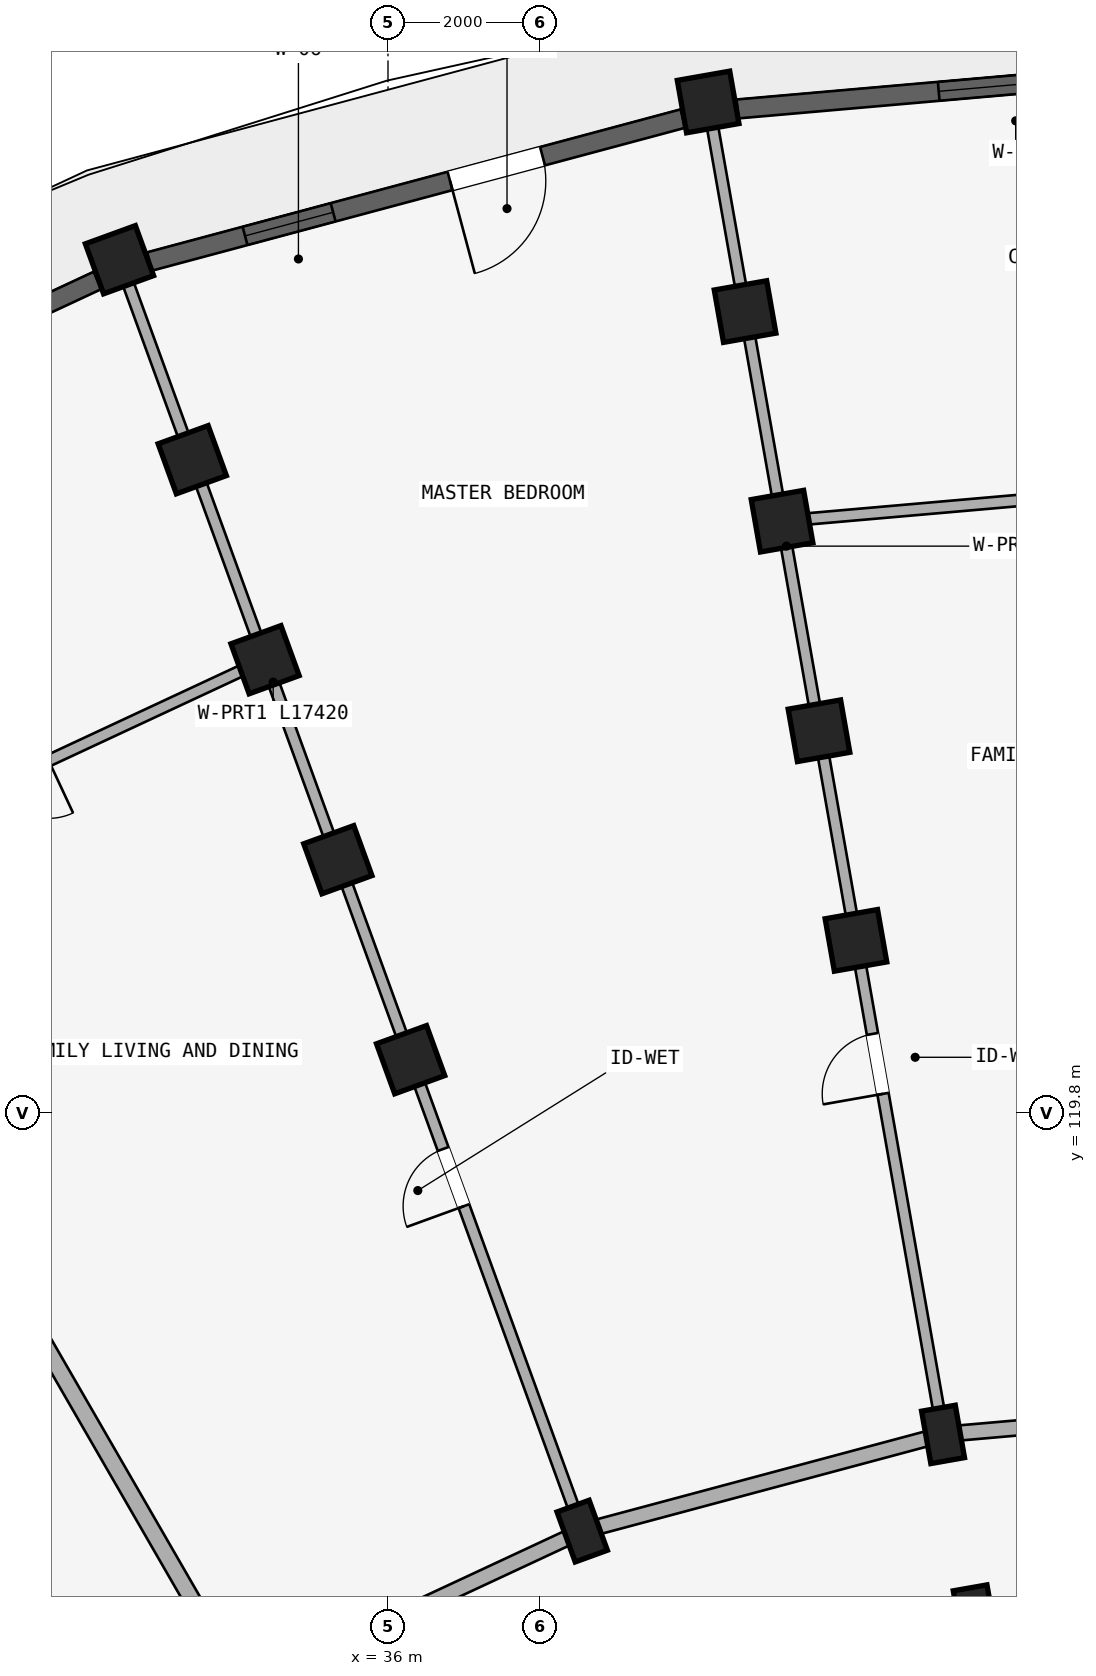
"""IFC4 building model, lengths in metres.
Left out: names, types, materials, properties, quantities, classifications, styles, units other than length and angle.
Written with IfcOpenShell. Run it as: python <this file> out.ifc"""

import sys

from ifc_helpers import new_model, si_unit, direction, frame, frame_2d, origin, origin_2d, place, context, subcontext, project, spatial, rectangle, extrude, element, fill, save


model = new_model("IFC4")
c1 = context("Model", 3, precision=1e-05, world=origin(), true_north=direction((0.0, 1.0)))
c2 = subcontext(c1, "Body", "Model", "MODEL_VIEW")
j1 = project(units=[si_unit("LENGTHUNIT", "METRE"), si_unit("PLANEANGLEUNIT", "RADIAN")], contexts=[c1])
p1 = place(None, origin())
s1 = spatial("IfcSite", under=j1, at=p1, CompositionType="ELEMENT")
p2 = place(p1, origin())
s2 = spatial("IfcBuilding", under=s1, at=p2, CompositionType="ELEMENT")
p3 = place(p2, frame((0.0, 0.0, 21.3)))
s3 = spatial("IfcBuildingStorey", under=s2, at=p3, CompositionType="ELEMENT", Elevation=21.3)
for number, where, z_axis, x_axis in (
    (1, (43.72, 113.208, 0.0), (0.0, 0.0, 1.0), (0.985, 0.174, 0.0)),
    (2, (43.303, 115.572, 0.0), (0.0, 0.0, 1.0), (0.985, 0.174, 0.0)),
):
    element("IfcColumn", number, at=place(p3, frame(where, z_axis=z_axis, x_axis=x_axis)), inside=s3, PredefinedType="COLUMN", context=c2, shape_type="SweptSolid", body=[
        extrude(rectangle(XDim=0.45, YDim=0.7, at=origin_2d()), origin(), (0.0, 0.0, 1.0), 2.93),
    ])
for number, where, z_axis, x_axis in (
    (3, (42.157, 122.071, 0.0), (0.0, 0.0, 1.0), (0.985, 0.174, 0.0)),
    (4, (41.671, 124.829, 0.0), (0.0, 0.0, 1.0), (0.985, 0.174, 0.0)),
    (5, (41.185, 127.586, 0.0), (0.0, 0.0, 1.0), (0.985, 0.174, 0.0)),
    (6, (40.698, 130.344, 0.0), (0.0, 0.0, 1.0), (0.985, 0.174, 0.0)),
    (7, (40.212, 133.101, 0.0), (0.0, 0.0, 1.0), (0.985, 0.174, 0.0)),
):
    element("IfcColumn", number, at=place(p3, frame(where, z_axis=z_axis, x_axis=x_axis)), inside=s3, PredefinedType="COLUMN", context=c2, shape_type="SweptSolid", body=[
        extrude(rectangle(XDim=0.7, YDim=0.7, at=origin_2d()), origin(), (0.0, 0.0, 1.0), 2.93),
    ])
p4 = place(p3, frame((38.555, 114.299, 0.0), z_axis=(0.0, 0.0, 1.0), x_axis=(0.939692620786, 0.342020143326, 0.0)))
e8 = element("IfcColumn", 8, at=p4, inside=s3, PredefinedType="COLUMN", context=c2, shape_type="SweptSolid", body=[
    extrude(rectangle(XDim=0.45, YDim=0.7, at=origin_2d()), origin(), (0.0, 0.0, 1.0), 2.93),
])
for number, where, z_axis, x_axis in (
    (9, (36.298, 120.501, 0.0), (0.0, 0.0, 1.0), (0.94, 0.342, 0.0)),
    (10, (35.34, 123.132, 0.0), (0.0, 0.0, 1.0), (0.94, 0.342, 0.0)),
    (11, (34.382, 125.764, 0.0), (0.0, 0.0, 1.0), (0.94, 0.342, 0.0)),
    (12, (33.425, 128.395, 0.0), (0.0, 0.0, 1.0), (0.94, 0.342, 0.0)),
    (13, (32.467, 131.026, 0.0), (0.0, 0.0, 1.0), (0.94, 0.342, 0.0)),
):
    element("IfcColumn", number, at=place(p3, frame(where, z_axis=z_axis, x_axis=x_axis)), inside=s3, PredefinedType="COLUMN", context=c2, shape_type="SweptSolid", body=[
        extrude(rectangle(XDim=0.7, YDim=0.7, at=origin_2d()), origin(), (0.0, 0.0, 1.0), 2.93),
    ])
p5 = place(p3, frame((48.2, 113.6, 0.0), z_axis=(0.0, 0.0, 1.0), x_axis=(-0.996191949488, -0.087187153726, 0.0)))
e14 = element("IfcWall", 14, at=p5, inside=s3, PredefinedType="STANDARD", context=c2, shape_type="SweptSolid", body=[
    extrude(rectangle(XDim=4.497, YDim=0.2, at=frame_2d((2.249, 0.0))), origin(), (0.0, 0.0, 1.0), 2.372),
])
p6 = place(p5, frame((1.729, 0.0, 0.0)))
e15 = element("IfcOpeningElement", 15, at=p6, cuts=e14, PredefinedType="OPENING", context=c2, shape_type="SweptSolid", body=[
    extrude(rectangle(XDim=1.04, YDim=2.15, at=frame_2d((0.52, 1.075))), frame((0.0, 0.11, 0.0), z_axis=(0.0, -1.0, 0.0), x_axis=(1.0, 0.0, 0.0)), (0.0, 0.0, 1.0), 0.22),
])
p7 = place(p3, frame((48.2, 116.0, 0.0), z_axis=(0.0, 0.0, 1.0), x_axis=(-0.996193663584, -0.087167566415, 0.0)))
e16 = element("IfcWall", 16, at=p7, inside=s3, PredefinedType="STANDARD", context=c2, shape_type="SweptSolid", body=[
    extrude(rectangle(XDim=4.916, YDim=0.2, at=frame_2d((2.458, 0.0))), origin(), (0.0, 0.0, 1.0), 2.372),
])
p8 = place(p7, frame((1.958, 0.0, 0.0)))
e17 = element("IfcOpeningElement", 17, at=p8, cuts=e16, PredefinedType="OPENING", context=c2, shape_type="SweptSolid", body=[
    extrude(rectangle(XDim=1.0, YDim=2.15, at=frame_2d((0.5, 1.075))), frame((0.0, 0.11, 0.0), z_axis=(0.0, -1.0, 0.0), x_axis=(1.0, 0.0, 0.0)), (0.0, 0.0, 1.0), 0.22),
])
p9 = place(p3, frame((43.303, 115.572, 0.0), z_axis=(0.0, 0.0, 1.0), x_axis=(-0.965930095386, -0.258803112091, 0.0)))
e18 = element("IfcWall", 18, at=p9, inside=s3, PredefinedType="STANDARD", context=c2, shape_type="SweptSolid", body=[
    extrude(rectangle(XDim=4.916, YDim=0.2, at=frame_2d((2.458, 0.0))), origin(), (0.0, 0.0, 1.0), 2.372),
])
p10 = place(p3, frame((38.555, 114.299, 0.0), z_axis=(0.0, 0.0, 1.0), x_axis=(-0.906302381024, -0.422629854778, 0.0)))
e19 = element("IfcWall", 19, at=p10, inside=s3, PredefinedType="STANDARD", context=c2, shape_type="SweptSolid", body=[
    extrude(rectangle(XDim=4.915, YDim=0.2, at=frame_2d((2.458, 0.0))), origin(), (0.0, 0.0, 1.0), 2.372),
])
p11 = place(p3, frame((43.286, 115.67, 0.0), z_axis=(0.0, 0.0, 1.0), x_axis=(-0.173646216546, 0.984808098809, 0.0)))
e20 = element("IfcWall", 20, at=p11, inside=s3, PredefinedType="PARTITIONING", context=c2, shape_type="SweptSolid", body=[
    extrude(rectangle(XDim=17.42, YDim=0.15, at=frame_2d((8.71, 0.0))), origin(), (0.0, 0.0, 1.0), 2.372),
])
p12 = place(p11, frame((4.45, 0.0, 0.0)))
e21 = element("IfcOpeningElement", 21, at=p12, cuts=e20, PredefinedType="OPENING", context=c2, shape_type="SweptSolid", body=[
    extrude(rectangle(XDim=0.8, YDim=2.1, at=frame_2d((0.4, 1.05))), frame((0.0, 0.085, 0.0), z_axis=(0.0, -1.0, 0.0), x_axis=(1.0, 0.0, 0.0)), (0.0, 0.0, 1.0), 0.17),
])
p13 = place(p3, frame((38.521, 114.393, 0.0), z_axis=(0.0, 0.0, 1.0), x_axis=(-0.342022120477, 0.939691901159, 0.0)))
e22 = element("IfcWall", 22, at=p13, inside=s3, PredefinedType="PARTITIONING", context=c2, shape_type="SweptSolid", body=[
    extrude(rectangle(XDim=17.42, YDim=0.15, at=frame_2d((8.71, 0.0))), origin(), (0.0, 0.0, 1.0), 2.372),
])
p14 = place(p13, frame((4.45, 0.0, 0.0)))
e23 = element("IfcOpeningElement", 23, at=p14, cuts=e22, PredefinedType="OPENING", context=c2, shape_type="SweptSolid", body=[
    extrude(rectangle(XDim=0.8, YDim=2.1, at=frame_2d((0.4, 1.05))), frame((0.0, 0.085, 0.0), z_axis=(0.0, -1.0, 0.0), x_axis=(1.0, 0.0, 0.0)), (0.0, 0.0, 1.0), 0.17),
])
p15 = place(p3, frame((34.05, 112.309, 0.0), z_axis=(0.0, 0.0, 1.0), x_axis=(-0.499997843263, 0.866026648973, 0.0)))
e24 = element("IfcWall", 24, at=p15, inside=s3, PredefinedType="STANDARD", context=c2, shape_type="SweptSolid", body=[
    extrude(rectangle(XDim=17.42, YDim=0.22, at=frame_2d((8.71, 0.0))), origin(), (0.0, 0.0, 1.0), 2.372),
])
p16 = place(p3, frame((48.2, 128.2, 0.0), z_axis=(0.0, 0.0, 1.0), x_axis=(-0.996194658198, -0.087156198737, 0.0)))
e25 = element("IfcWall", 25, at=p16, inside=s3, PredefinedType="PLUMBINGWALL", context=c2, shape_type="SweptSolid", body=[
    extrude(rectangle(XDim=7.042, YDim=0.15, at=frame_2d((3.521, 0.0))), origin(), (0.0, 0.0, 1.0), 2.372),
])
p17 = place(p16, frame((3.121, 0.0, 0.0)))
e26 = element("IfcOpeningElement", 26, at=p17, cuts=e25, PredefinedType="OPENING", context=c2, shape_type="SweptSolid", body=[
    extrude(rectangle(XDim=0.8, YDim=2.1, at=frame_2d((0.4, 1.05))), frame((0.0, 0.085, 0.0), z_axis=(0.0, -1.0, 0.0), x_axis=(1.0, 0.0, 0.0)), (0.0, 0.0, 1.0), 0.17),
])
p18 = place(p3, frame((34.382, 125.764, 0.0), z_axis=(0.0, 0.0, 1.0), x_axis=(-0.906297360311, -0.422640621205, 0.0)))
e27 = element("IfcWall", 27, at=p18, inside=s3, PredefinedType="PLUMBINGWALL", context=c2, shape_type="SweptSolid", body=[
    extrude(rectangle(XDim=7.042, YDim=0.15, at=frame_2d((3.521, 0.0))), origin(), (0.0, 0.0, 1.0), 2.372),
])
p19 = place(p18, frame((3.141, 0.0, 0.0)))
e28 = element("IfcOpeningElement", 28, at=p19, cuts=e27, PredefinedType="OPENING", context=c2, shape_type="SweptSolid", body=[
    extrude(rectangle(XDim=0.76, YDim=2.05, at=frame_2d((0.38, 1.025))), frame((0.0, 0.085, 0.0), z_axis=(0.0, -1.0, 0.0), x_axis=(1.0, 0.0, 0.0)), (0.0, 0.0, 1.0), 0.17),
])
p20 = place(p3, frame((47.836, 133.643, 0.0), z_axis=(0.0, 0.0, 1.0), x_axis=(-0.99619214922, -0.08718487158, 0.0)))
e29 = element("IfcWall", 29, at=p20, inside=s3, PredefinedType="STANDARD", context=c2, shape_type="SweptSolid", body=[
    extrude(rectangle(XDim=7.267, YDim=0.25, at=frame_2d((3.633, 0.0))), origin(), (0.0, 0.0, 1.0), 2.472),
])
p21 = place(p20, frame((2.658, 0.0, 0.422)))
e30 = element("IfcOpeningElement", 30, at=p21, cuts=e29, PredefinedType="OPENING", context=c2, shape_type="SweptSolid", body=[
    extrude(rectangle(XDim=1.95, YDim=1.85, at=frame_2d((0.975, 0.925))), frame((0.0, 0.135, 0.0), z_axis=(0.0, -1.0, 0.0), x_axis=(1.0, 0.0, 0.0)), (0.0, 0.0, 1.0), 0.27),
])
p22 = place(p3, frame((39.882, 132.883, 0.0), z_axis=(0.0, 0.0, 1.0), x_axis=(-0.965930355787, -0.258802140196, 0.0)))
e31 = element("IfcWall", 31, at=p22, inside=s3, PredefinedType="STANDARD", context=c2, shape_type="SweptSolid", body=[
    extrude(rectangle(XDim=7.267, YDim=0.25, at=frame_2d((3.633, 0.0))), origin(), (0.0, 0.0, 1.0), 2.472),
])
p23 = place(p22, frame((4.766, 0.0, 0.622)))
e32 = element("IfcOpeningElement", 32, at=p23, cuts=e31, PredefinedType="OPENING", context=c2, shape_type="SweptSolid", body=[
    extrude(rectangle(XDim=1.2, YDim=1.5, at=frame_2d((0.6, 0.75))), frame((0.0, 0.135, 0.0), z_axis=(0.0, -1.0, 0.0), x_axis=(1.0, 0.0, 0.0)), (0.0, 0.0, 1.0), 0.27),
])
p24 = place(p22, frame((1.913, 0.0, 0.0)))
e33 = element("IfcOpeningElement", 33, at=p24, cuts=e31, PredefinedType="OPENING", context=c2, shape_type="SweptSolid", body=[
    extrude(rectangle(XDim=1.26, YDim=2.15, at=frame_2d((0.63, 1.075))), frame((0.0, 0.135, 0.0), z_axis=(0.0, -1.0, 0.0), x_axis=(1.0, 0.0, 0.0)), (0.0, 0.0, 1.0), 0.27),
])
p25 = place(p3, frame((32.179, 130.754, 0.0), z_axis=(0.0, 0.0, 1.0), x_axis=(-0.90630327107, -0.422627946127, 0.0)))
e34 = element("IfcWall", 34, at=p25, inside=s3, PredefinedType="STANDARD", context=c2, shape_type="SweptSolid", body=[
    extrude(rectangle(XDim=7.267, YDim=0.25, at=frame_2d((3.633, 0.0))), origin(), (0.0, 0.0, 1.0), 2.472),
])
p26 = place(p25, frame((2.808, 0.0, 0.522)))
e35 = element("IfcOpeningElement", 35, at=p26, cuts=e34, PredefinedType="OPENING", context=c2, shape_type="SweptSolid", body=[
    extrude(rectangle(XDim=1.65, YDim=1.75, at=frame_2d((0.825, 0.875))), frame((0.0, 0.135, 0.0), z_axis=(0.0, -1.0, 0.0), x_axis=(1.0, 0.0, 0.0)), (0.0, 0.0, 1.0), 0.27),
])
p27 = place(p21, origin())
e36 = element("IfcWindow", 36, at=p27, inside=s3, PartitioningType="DOUBLE_PANEL_VERTICAL", PredefinedType="WINDOW", context=c2, shape_type="SweptSolid", body=[
    extrude(rectangle(XDim=1.95, YDim=1.85, at=frame_2d((0.975, 0.925))), frame((0.0, 0.03, 0.0), z_axis=(0.0, -1.0, 0.0), x_axis=(1.0, 0.0, 0.0)), (0.0, 0.0, 1.0), 0.06),
])
fill(e30, e36)
p28 = place(p23, origin())
e37 = element("IfcWindow", 37, at=p28, inside=s3, PartitioningType="SINGLE_PANEL", PredefinedType="WINDOW", context=c2, shape_type="SweptSolid", body=[
    extrude(rectangle(XDim=1.2, YDim=1.5, at=frame_2d((0.6, 0.75))), frame((0.0, 0.03, 0.0), z_axis=(0.0, -1.0, 0.0), x_axis=(1.0, 0.0, 0.0)), (0.0, 0.0, 1.0), 0.06),
])
fill(e32, e37)
p29 = place(p12, origin())
e38 = element("IfcDoor", 38, at=p29, inside=s3, OperationType="SINGLE_SWING_LEFT", PredefinedType="DOOR", context=c2, shape_type="SweptSolid", body=[
    extrude(rectangle(XDim=0.8, YDim=2.1, at=frame_2d((0.4, 1.05))), frame((0.0, 0.025, 0.0), z_axis=(0.0, -1.0, 0.0), x_axis=(1.0, 0.0, 0.0)), (0.0, 0.0, 1.0), 0.05),
])
fill(e21, e38)
p30 = place(p14, frame((0.8, 0.0, 0.0), z_axis=(0.0, 0.0, 1.0), x_axis=(-1.0, 0.0, 0.0)))
e39 = element("IfcDoor", 39, at=p30, inside=s3, OperationType="SINGLE_SWING_RIGHT", PredefinedType="DOOR", context=c2, shape_type="SweptSolid", body=[
    extrude(rectangle(XDim=0.8, YDim=2.1, at=frame_2d((0.4, 1.05))), frame((0.0, 0.025, 0.0), z_axis=(0.0, -1.0, 0.0), x_axis=(1.0, 0.0, 0.0)), (0.0, 0.0, 1.0), 0.05),
])
fill(e23, e39)
p31 = place(p24, frame((1.26, 0.0, 0.0), z_axis=(0.0, 0.0, 1.0), x_axis=(-1.0, 0.0, 0.0)))
e40 = element("IfcDoor", 40, at=p31, inside=s3, OperationType="SINGLE_SWING_LEFT", PredefinedType="DOOR", context=c2, shape_type="SweptSolid", body=[
    extrude(rectangle(XDim=1.26, YDim=2.15, at=frame_2d((0.63, 1.075))), frame((0.0, 0.025, 0.0), z_axis=(0.0, -1.0, 0.0), x_axis=(1.0, 0.0, 0.0)), (0.0, 0.0, 1.0), 0.05),
])
fill(e33, e40)
save(model, sys.argv[1])
